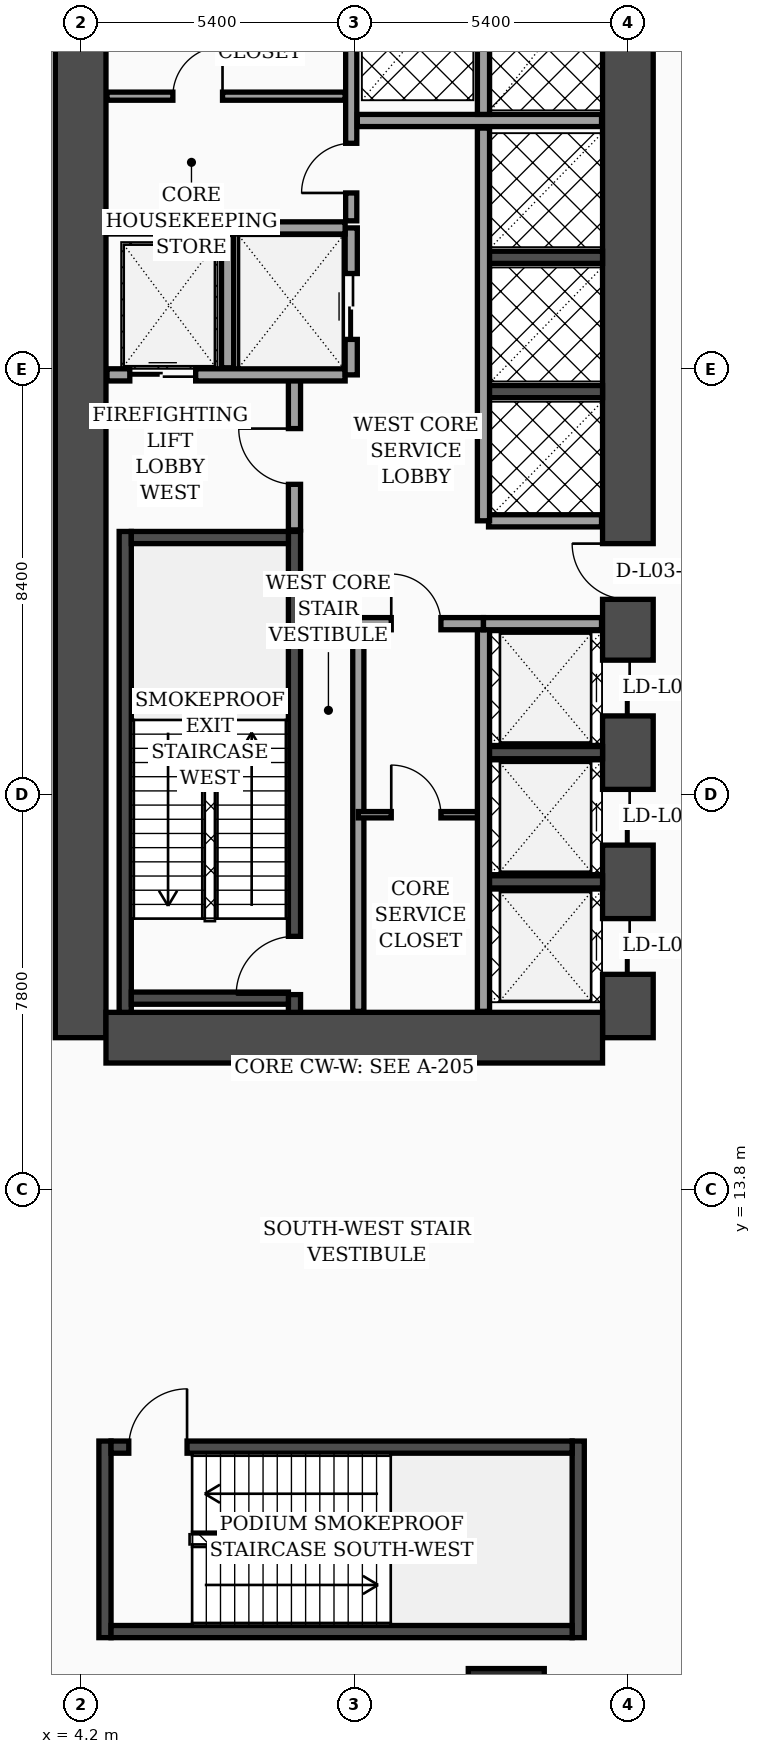
"""IFC4 building model, lengths in metres.
Left out: names, types, materials, properties, quantities, classifications, styles, units other than length and angle.
Written with IfcOpenShell. Run it as: python <this file> out.ifc"""

import sys

from ifc_helpers import new_model, si_unit, direction, frame, frame_2d, origin, origin_2d, place, context, subcontext, project, spatial, rectangle, extrude, element, fill, save


model = new_model("IFC4")
c1 = context("Model", 3, precision=1e-05, world=origin(), true_north=direction((0.0, 1.0)))
c2 = subcontext(c1, "Body", "Model", "MODEL_VIEW")
j1 = project(units=[si_unit("LENGTHUNIT", "METRE"), si_unit("PLANEANGLEUNIT", "RADIAN")], contexts=[c1])
p1 = place(None, origin())
s1 = spatial("IfcSite", under=j1, at=p1, CompositionType="ELEMENT")
p2 = place(p1, origin())
s2 = spatial("IfcBuilding", under=s1, at=p2, CompositionType="ELEMENT")
p3 = place(p2, frame((0.0, 0.0, 17.0)))
s3 = spatial("IfcBuildingStorey", under=s2, at=p3, CompositionType="ELEMENT", Elevation=17.0)
p4 = place(p3, frame((4.2, 16.8, 0.0), z_axis=(0.0, 0.0, 1.0), x_axis=(0.0, 1.0, 0.0)))
e1 = element("IfcWall", 1, at=p4, inside=s3, PredefinedType="SHEAR", context=c2, shape_type="SweptSolid", body=[
    extrude(rectangle(XDim=21.6, YDim=1.0, at=frame_2d((10.8, 0.0))), origin(), (0.0, 0.0, 1.0), 4.55),
])
p5 = place(p3, frame((15.0, 16.8, 0.0), z_axis=(0.0, 0.0, 1.0), x_axis=(0.0, 1.0, 0.0)))
e2 = element("IfcWall", 2, at=p5, inside=s3, PredefinedType="SHEAR", context=c2, shape_type="SweptSolid", body=[
    extrude(rectangle(XDim=21.6, YDim=1.0, at=frame_2d((10.8, 0.0))), origin(), (0.0, 0.0, 1.0), 4.55),
])
p6 = place(p5, frame((8.65, 0.0, 0.0)))
e3 = element("IfcOpeningElement", 3, at=p6, cuts=e2, PredefinedType="OPENING", context=c2, shape_type="SweptSolid", body=[
    extrude(rectangle(XDim=1.1, YDim=2.2, at=frame_2d((0.55, 1.1))), frame((0.0, 0.51, 0.0), z_axis=(0.0, -1.0, 0.0), x_axis=(1.0, 0.0, 0.0)), (0.0, 0.0, 1.0), 1.02),
])
p7 = place(p5, frame((1.25, 0.0, 0.0)))
e4 = element("IfcOpeningElement", 4, at=p7, cuts=e2, PredefinedType="OPENING", context=c2, shape_type="SweptSolid", body=[
    extrude(rectangle(XDim=1.1, YDim=2.2, at=frame_2d((0.55, 1.1))), frame((0.0, 0.51, 0.0), z_axis=(0.0, -1.0, 0.0), x_axis=(1.0, 0.0, 0.0)), (0.0, 0.0, 1.0), 1.02),
])
p8 = place(p5, frame((3.8, 0.0, 0.0)))
e5 = element("IfcOpeningElement", 5, at=p8, cuts=e2, PredefinedType="OPENING", context=c2, shape_type="SweptSolid", body=[
    extrude(rectangle(XDim=1.1, YDim=2.2, at=frame_2d((0.55, 1.1))), frame((0.0, 0.51, 0.0), z_axis=(0.0, -1.0, 0.0), x_axis=(1.0, 0.0, 0.0)), (0.0, 0.0, 1.0), 1.02),
])
p9 = place(p5, frame((6.35, 0.0, 0.0)))
e6 = element("IfcOpeningElement", 6, at=p9, cuts=e2, PredefinedType="OPENING", context=c2, shape_type="SweptSolid", body=[
    extrude(rectangle(XDim=1.1, YDim=2.2, at=frame_2d((0.55, 1.1))), frame((0.0, 0.51, 0.0), z_axis=(0.0, -1.0, 0.0), x_axis=(1.0, 0.0, 0.0)), (0.0, 0.0, 1.0), 1.02),
])
p10 = place(p3, frame((4.7, 16.8, 0.0), z_axis=(0.0, 0.0, 1.0), x_axis=(1.0, 0.0, 0.0)))
e7 = element("IfcWall", 7, at=p10, inside=s3, PredefinedType="SHEAR", context=c2, shape_type="SweptSolid", body=[
    extrude(rectangle(XDim=9.8, YDim=1.0, at=frame_2d((4.9, 0.0))), origin(), (0.0, 0.0, 1.0), 4.55),
])
p11 = place(p3, frame((5.08, 17.3, 0.0), z_axis=(0.0, 0.0, 1.0), x_axis=(0.0, 1.0, 0.0)))
e8 = element("IfcWall", 8, at=p11, inside=s3, PredefinedType="SOLIDWALL", context=c2, shape_type="SweptSolid", body=[
    extrude(rectangle(XDim=9.49, YDim=0.24, at=frame_2d((4.745, 0.0))), origin(), (0.0, 0.0, 1.0), 4.55),
])
p12 = place(p3, frame((8.42, 17.3, 0.0), z_axis=(0.0, 0.0, 1.0), x_axis=(0.0, 1.0, 0.0)))
e9 = element("IfcWall", 9, at=p12, inside=s3, PredefinedType="SOLIDWALL", context=c2, shape_type="SweptSolid", body=[
    extrude(rectangle(XDim=9.49, YDim=0.24, at=frame_2d((4.745, 0.0))), origin(), (0.0, 0.0, 1.0), 4.55),
])
p13 = place(p12, frame((0.35, 0.0, 0.0)))
e10 = element("IfcOpeningElement", 10, at=p13, cuts=e9, PredefinedType="OPENING", context=c2, shape_type="SweptSolid", body=[
    extrude(rectangle(XDim=1.15, YDim=2.2, at=frame_2d((0.575, 1.1))), frame((0.0, 0.13, 0.0), z_axis=(0.0, -1.0, 0.0), x_axis=(1.0, 0.0, 0.0)), (0.0, 0.0, 1.0), 0.26),
])
for number, where, z_axis, x_axis in (
    (11, (5.2, 17.58, 0.0), (0.0, 0.0, 1.0), (1.0, 0.0, 0.0)),
    (12, (5.2, 26.67, 0.0), (0.0, 0.0, 1.0), (1.0, 0.0, 0.0)),
):
    element("IfcWall", number, at=place(p3, frame(where, z_axis=z_axis, x_axis=x_axis)), inside=s3, PredefinedType="SOLIDWALL", context=c2, shape_type="SweptSolid", body=[
        extrude(rectangle(XDim=3.1, YDim=0.24, at=frame_2d((1.55, 0.0))), origin(), (0.0, 0.0, 1.0), 4.55),
    ])
for number, where, z_axis, x_axis in (
    (13, (4.68, 4.96, 0.0), (0.0, 0.0, 1.0), (0.0, 1.0, 0.0)),
    (14, (14.02, 4.96, 0.0), (0.0, 0.0, 1.0), (0.0, 1.0, 0.0)),
):
    element("IfcWall", number, at=place(p3, frame(where, z_axis=z_axis, x_axis=x_axis)), inside=s3, PredefinedType="SOLIDWALL", context=c2, shape_type="SweptSolid", body=[
        extrude(rectangle(XDim=3.88, YDim=0.24, at=frame_2d((1.94, 0.0))), origin(), (0.0, 0.0, 1.0), 4.55),
    ])
p14 = place(p3, frame((4.8, 5.08, 0.0), z_axis=(0.0, 0.0, 1.0), x_axis=(1.0, 0.0, 0.0)))
e15 = element("IfcWall", 15, at=p14, inside=s3, PredefinedType="SOLIDWALL", context=c2, shape_type="SweptSolid", body=[
    extrude(rectangle(XDim=9.1, YDim=0.24, at=frame_2d((4.55, 0.0))), origin(), (0.0, 0.0, 1.0), 4.55),
])
p15 = place(p3, frame((4.8, 8.72, 0.0), z_axis=(0.0, 0.0, 1.0), x_axis=(1.0, 0.0, 0.0)))
e16 = element("IfcWall", 16, at=p15, inside=s3, PredefinedType="SOLIDWALL", context=c2, shape_type="SweptSolid", body=[
    extrude(rectangle(XDim=9.1, YDim=0.24, at=frame_2d((4.55, 0.0))), origin(), (0.0, 0.0, 1.0), 4.55),
])
p16 = place(p15, frame((0.35, 0.0, 0.0)))
e17 = element("IfcOpeningElement", 17, at=p16, cuts=e16, PredefinedType="OPENING", context=c2, shape_type="SweptSolid", body=[
    extrude(rectangle(XDim=1.15, YDim=2.2, at=frame_2d((0.575, 1.1))), frame((0.0, 0.13, 0.0), z_axis=(0.0, -1.0, 0.0), x_axis=(1.0, 0.0, 0.0)), (0.0, 0.0, 1.0), 0.26),
])
for number, where, z_axis, x_axis in (
    (18, (12.18, 19.875, 0.0), (0.0, 0.0, 1.0), (1.0, 0.0, 0.0)),
    (19, (12.18, 22.425, 0.0), (0.0, 0.0, 1.0), (1.0, 0.0, 0.0)),
    (20, (12.18, 29.55, 0.0), (0.0, 0.0, 1.0), (1.0, 0.0, 0.0)),
    (21, (12.18, 32.2, 0.0), (0.0, 0.0, 1.0), (1.0, 0.0, 0.0)),
):
    element("IfcWall", number, at=place(p3, frame(where, z_axis=z_axis, x_axis=x_axis)), inside=s3, PredefinedType="SOLIDWALL", context=c2, shape_type="SweptSolid", body=[
        extrude(rectangle(XDim=2.32, YDim=0.24, at=frame_2d((1.16, 0.0))), origin(), (0.0, 0.0, 1.0), 4.55),
    ])
p17 = place(p3, frame((12.6, 3.6, 0.0), z_axis=(0.0, 0.0, 1.0), x_axis=(1.0, 0.0, 0.0)))
e22 = element("IfcColumn", 22, at=p17, inside=s3, PredefinedType="COLUMN", context=c2, shape_type="SweptSolid", body=[
    extrude(rectangle(XDim=1.5, YDim=1.5, at=origin_2d()), origin(), (0.0, 0.0, 1.0), 4.55),
])
p18 = place(p3, frame((8.42, 26.82, 0.0), z_axis=(0.0, 0.0, 1.0), x_axis=(0.0, 1.0, 0.0)))
e23 = element("IfcWall", 23, at=p18, inside=s3, PredefinedType="SOLIDWALL", context=c2, shape_type="SweptSolid", body=[
    extrude(rectangle(XDim=3.0, YDim=0.24, at=frame_2d((1.5, 0.0))), origin(), (0.0, 0.0, 1.0), 4.55),
])
p19 = place(p18, frame((0.9, 0.0, 0.0)))
e24 = element("IfcOpeningElement", 24, at=p19, cuts=e23, PredefinedType="OPENING", context=c2, shape_type="SweptSolid", body=[
    extrude(rectangle(XDim=1.1, YDim=2.2, at=frame_2d((0.55, 1.1))), frame((0.0, 0.13, 0.0), z_axis=(0.0, -1.0, 0.0), x_axis=(1.0, 0.0, 0.0)), (0.0, 0.0, 1.0), 0.26),
])
p20 = place(p3, frame((4.72, 29.88, 0.0), z_axis=(0.0, 0.0, 1.0), x_axis=(1.0, 0.0, 0.0)))
e25 = element("IfcWall", 25, at=p20, inside=s3, PredefinedType="SOLIDWALL", context=c2, shape_type="SweptSolid", body=[
    extrude(rectangle(XDim=4.7, YDim=0.24, at=frame_2d((2.35, 0.0))), origin(), (0.0, 0.0, 1.0), 4.55),
])
p21 = place(p20, frame((0.45, 0.0, 0.0)))
e26 = element("IfcOpeningElement", 26, at=p21, cuts=e25, PredefinedType="OPENING", context=c2, shape_type="SweptSolid", body=[
    extrude(rectangle(XDim=1.3, YDim=2.35, at=frame_2d((0.65, 1.175))), frame((0.0, 0.13, 0.0), z_axis=(0.0, -1.0, 0.0), x_axis=(1.0, 0.0, 0.0)), (0.0, 0.0, 1.0), 0.26),
])
p22 = place(p3, frame((7.1, 30.02, 0.0), z_axis=(0.0, 0.0, 1.0), x_axis=(0.0, 1.0, 0.0)))
e27 = element("IfcWall", 27, at=p22, inside=s3, PredefinedType="SOLIDWALL", context=c2, shape_type="SweptSolid", body=[
    extrude(rectangle(XDim=2.63, YDim=0.24, at=frame_2d((1.315, 0.0))), origin(), (0.0, 0.0, 1.0), 4.55),
])
p23 = place(p3, frame((9.54, 29.88, 0.0), z_axis=(0.0, 0.0, 1.0), x_axis=(0.0, 1.0, 0.0)))
e28 = element("IfcWall", 28, at=p23, inside=s3, PredefinedType="SOLIDWALL", context=c2, shape_type="SweptSolid", body=[
    extrude(rectangle(XDim=2.9, YDim=0.24, at=frame_2d((1.45, 0.0))), origin(), (0.0, 0.0, 1.0), 4.55),
])
p24 = place(p23, frame((0.7, 0.0, 0.0)))
e29 = element("IfcOpeningElement", 29, at=p24, cuts=e28, PredefinedType="OPENING", context=c2, shape_type="SweptSolid", body=[
    extrude(rectangle(XDim=1.3, YDim=2.35, at=frame_2d((0.65, 1.175))), frame((0.0, 0.13, 0.0), z_axis=(0.0, -1.0, 0.0), x_axis=(1.0, 0.0, 0.0)), (0.0, 0.0, 1.0), 0.26),
])
p25 = place(p3, frame((4.72, 32.78, 0.0), z_axis=(0.0, 0.0, 1.0), x_axis=(1.0, 0.0, 0.0)))
e30 = element("IfcWall", 30, at=p25, inside=s3, PredefinedType="SOLIDWALL", context=c2, shape_type="SweptSolid", body=[
    extrude(rectangle(XDim=4.7, YDim=0.24, at=frame_2d((2.35, 0.0))), origin(), (0.0, 0.0, 1.0), 4.55),
])
p26 = place(p3, frame((9.68, 17.32, 0.0), z_axis=(0.0, 0.0, 1.0), x_axis=(0.0, 1.0, 0.0)))
e31 = element("IfcWall", 31, at=p26, inside=s3, PredefinedType="SOLIDWALL", context=c2, shape_type="SweptSolid", body=[
    extrude(rectangle(XDim=7.68, YDim=0.22, at=frame_2d((3.84, 0.0))), origin(), (0.0, 0.0, 1.0), 4.55),
])
p27 = place(p3, frame((4.72, 35.38, 0.0), z_axis=(0.0, 0.0, 1.0), x_axis=(1.0, 0.0, 0.0)))
e32 = element("IfcWall", 32, at=p27, inside=s3, PredefinedType="PARTITIONING", context=c2, shape_type="SweptSolid", body=[
    extrude(rectangle(XDim=4.7, YDim=0.16, at=frame_2d((2.35, 0.0))), origin(), (0.0, 0.0, 1.0), 4.55),
])
p28 = place(p27, frame((1.3, 0.0, 0.0)))
e33 = element("IfcOpeningElement", 33, at=p28, cuts=e32, PredefinedType="OPENING", context=c2, shape_type="SweptSolid", body=[
    extrude(rectangle(XDim=0.98, YDim=2.15, at=frame_2d((0.49, 1.075))), frame((0.0, 0.09, 0.0), z_axis=(0.0, -1.0, 0.0), x_axis=(1.0, 0.0, 0.0)), (0.0, 0.0, 1.0), 0.18),
])
p29 = place(p3, frame((9.54, 32.92, 0.0), z_axis=(0.0, 0.0, 1.0), x_axis=(0.0, 1.0, 0.0)))
e34 = element("IfcWall", 34, at=p29, inside=s3, PredefinedType="SOLIDWALL", context=c2, shape_type="SweptSolid", body=[
    extrude(rectangle(XDim=4.96, YDim=0.22, at=frame_2d((2.48, 0.0))), origin(), (0.0, 0.0, 1.0), 4.55),
])
p30 = place(p29, frame((0.55, 0.0, 0.0)))
e35 = element("IfcOpeningElement", 35, at=p30, cuts=e34, PredefinedType="OPENING", context=c2, shape_type="SweptSolid", body=[
    extrude(rectangle(XDim=0.98, YDim=2.15, at=frame_2d((0.49, 1.075))), frame((0.0, 0.12, 0.0), z_axis=(0.0, -1.0, 0.0), x_axis=(1.0, 0.0, 0.0)), (0.0, 0.0, 1.0), 0.24),
])
p31 = place(p3, frame((9.68, 21.2, 0.0), z_axis=(0.0, 0.0, 1.0), x_axis=(1.0, 0.0, 0.0)))
e36 = element("IfcWall", 36, at=p31, inside=s3, PredefinedType="PARTITIONING", context=c2, shape_type="SweptSolid", body=[
    extrude(rectangle(XDim=2.47, YDim=0.125, at=frame_2d((1.235, 0.0))), origin(), (0.0, 0.0, 1.0), 4.55),
])
p32 = place(p31, frame((0.65, 0.0, 0.0)))
e37 = element("IfcOpeningElement", 37, at=p32, cuts=e36, PredefinedType="OPENING", context=c2, shape_type="SweptSolid", body=[
    extrude(rectangle(XDim=0.98, YDim=2.15, at=frame_2d((0.49, 1.075))), frame((0.0, 0.073, 0.0), z_axis=(0.0, -1.0, 0.0), x_axis=(1.0, 0.0, 0.0)), (0.0, 0.0, 1.0), 0.145),
])
p33 = place(p3, frame((12.15, 17.32, 0.0), z_axis=(0.0, 0.0, 1.0), x_axis=(0.0, 1.0, 0.0)))
e38 = element("IfcWall", 38, at=p33, inside=s3, PredefinedType="SOLIDWALL", context=c2, shape_type="SweptSolid", body=[
    extrude(rectangle(XDim=7.65, YDim=0.24, at=frame_2d((3.825, 0.0))), origin(), (0.0, 0.0, 1.0), 4.55),
])
p34 = place(p3, frame((9.68, 24.97, 0.0), z_axis=(0.0, 0.0, 1.0), x_axis=(1.0, 0.0, 0.0)))
e39 = element("IfcWall", 39, at=p34, inside=s3, PredefinedType="SOLIDWALL", context=c2, shape_type="SweptSolid", body=[
    extrude(rectangle(XDim=2.47, YDim=0.24, at=frame_2d((1.235, 0.0))), origin(), (0.0, 0.0, 1.0), 4.55),
])
p35 = place(p34, frame((0.65, 0.0, 0.0)))
e40 = element("IfcOpeningElement", 40, at=p35, cuts=e39, PredefinedType="OPENING", context=c2, shape_type="SweptSolid", body=[
    extrude(rectangle(XDim=0.98, YDim=2.15, at=frame_2d((0.49, 1.075))), frame((0.0, 0.13, 0.0), z_axis=(0.0, -1.0, 0.0), x_axis=(1.0, 0.0, 0.0)), (0.0, 0.0, 1.0), 0.26),
])
p36 = place(p3, frame((12.15, 24.97, 0.0), z_axis=(0.0, 0.0, 1.0), x_axis=(1.0, 0.0, 0.0)))
e41 = element("IfcWall", 41, at=p36, inside=s3, PredefinedType="SOLIDWALL", context=c2, shape_type="SweptSolid", body=[
    extrude(rectangle(XDim=2.33, YDim=0.24, at=frame_2d((1.165, 0.0))), origin(), (0.0, 0.0, 1.0), 3.75),
])
p37 = place(p3, frame((12.25, 27.0, 0.0), z_axis=(0.0, 0.0, 1.0), x_axis=(1.0, 0.0, 0.0)))
e42 = element("IfcWall", 42, at=p37, inside=s3, PredefinedType="SOLIDWALL", context=c2, shape_type="SweptSolid", body=[
    extrude(rectangle(XDim=2.23, YDim=0.24, at=frame_2d((1.115, 0.0))), origin(), (0.0, 0.0, 1.0), 4.55),
])
p38 = place(p3, frame((12.15, 27.0, 0.0), z_axis=(0.0, 0.0, 1.0), x_axis=(0.0, 1.0, 0.0)))
e43 = element("IfcWall", 43, at=p38, inside=s3, PredefinedType="SOLIDWALL", context=c2, shape_type="SweptSolid", body=[
    extrude(rectangle(XDim=7.75, YDim=0.24, at=frame_2d((3.875, 0.0))), origin(), (0.0, 0.0, 1.0), 4.55),
])
p39 = place(p3, frame((9.66, 34.9, 0.0), z_axis=(0.0, 0.0, 1.0), x_axis=(1.0, 0.0, 0.0)))
e44 = element("IfcWall", 44, at=p39, inside=s3, PredefinedType="SOLIDWALL", context=c2, shape_type="SweptSolid", body=[
    extrude(rectangle(XDim=4.82, YDim=0.24, at=frame_2d((2.41, 0.0))), origin(), (0.0, 0.0, 1.0), 4.55),
])
p40 = place(p3, frame((12.15, 35.02, 0.0), z_axis=(0.0, 0.0, 1.0), x_axis=(0.0, 1.0, 0.0)))
e45 = element("IfcWall", 45, at=p40, inside=s3, PredefinedType="SOLIDWALL", context=c2, shape_type="SweptSolid", body=[
    extrude(rectangle(XDim=2.86, YDim=0.24, at=frame_2d((1.43, 0.0))), origin(), (0.0, 0.0, 1.0), 4.55),
])
p41 = place(p19, origin())
e46 = element("IfcDoor", 46, at=p41, inside=s3, OperationType="SINGLE_SWING_RIGHT", PredefinedType="DOOR", context=c2, shape_type="SweptSolid", body=[
    extrude(rectangle(XDim=1.1, YDim=2.2, at=frame_2d((0.55, 1.1))), frame((0.0, 0.025, 0.0), z_axis=(0.0, -1.0, 0.0), x_axis=(1.0, 0.0, 0.0)), (0.0, 0.0, 1.0), 0.05),
])
fill(e24, e46)
p42 = place(p21, origin())
e47 = element("IfcDoor", 47, at=p42, inside=s3, OperationType="DOUBLE_DOOR_SLIDING", PredefinedType="DOOR", context=c2, shape_type="SweptSolid", body=[
    extrude(rectangle(XDim=1.3, YDim=2.35, at=frame_2d((0.65, 1.175))), frame((0.0, 0.025, 0.0), z_axis=(0.0, -1.0, 0.0), x_axis=(1.0, 0.0, 0.0)), (0.0, 0.0, 1.0), 0.05),
])
fill(e26, e47)
p43 = place(p24, origin())
e48 = element("IfcDoor", 48, at=p43, inside=s3, OperationType="DOUBLE_DOOR_SLIDING", PredefinedType="DOOR", context=c2, shape_type="SweptSolid", body=[
    extrude(rectangle(XDim=1.3, YDim=2.35, at=frame_2d((0.65, 1.175))), frame((0.0, 0.025, 0.0), z_axis=(0.0, -1.0, 0.0), x_axis=(1.0, 0.0, 0.0)), (0.0, 0.0, 1.0), 0.05),
])
fill(e29, e48)
p44 = place(p28, origin())
e49 = element("IfcDoor", 49, at=p44, inside=s3, OperationType="SINGLE_SWING_RIGHT", PredefinedType="DOOR", context=c2, shape_type="SweptSolid", body=[
    extrude(rectangle(XDim=0.98, YDim=2.15, at=frame_2d((0.49, 1.075))), frame((0.0, 0.025, 0.0), z_axis=(0.0, -1.0, 0.0), x_axis=(1.0, 0.0, 0.0)), (0.0, 0.0, 1.0), 0.05),
])
fill(e33, e49)
p45 = place(p30, origin())
e50 = element("IfcDoor", 50, at=p45, inside=s3, OperationType="SINGLE_SWING_LEFT", PredefinedType="DOOR", context=c2, shape_type="SweptSolid", body=[
    extrude(rectangle(XDim=0.98, YDim=2.15, at=frame_2d((0.49, 1.075))), frame((0.0, 0.025, 0.0), z_axis=(0.0, -1.0, 0.0), x_axis=(1.0, 0.0, 0.0)), (0.0, 0.0, 1.0), 0.05),
])
fill(e35, e50)
p46 = place(p32, origin())
e51 = element("IfcDoor", 51, at=p46, inside=s3, OperationType="SINGLE_SWING_LEFT", PredefinedType="DOOR", context=c2, shape_type="SweptSolid", body=[
    extrude(rectangle(XDim=0.98, YDim=2.15, at=frame_2d((0.49, 1.075))), frame((0.0, 0.025, 0.0), z_axis=(0.0, -1.0, 0.0), x_axis=(1.0, 0.0, 0.0)), (0.0, 0.0, 1.0), 0.05),
])
fill(e37, e51)
p47 = place(p35, origin())
e52 = element("IfcDoor", 52, at=p47, inside=s3, OperationType="SINGLE_SWING_LEFT", PredefinedType="DOOR", context=c2, shape_type="SweptSolid", body=[
    extrude(rectangle(XDim=0.98, YDim=2.15, at=frame_2d((0.49, 1.075))), frame((0.0, 0.025, 0.0), z_axis=(0.0, -1.0, 0.0), x_axis=(1.0, 0.0, 0.0)), (0.0, 0.0, 1.0), 0.05),
])
fill(e40, e52)
p48 = place(p13, origin())
e53 = element("IfcDoor", 53, at=p48, inside=s3, OperationType="SINGLE_SWING_LEFT", PredefinedType="DOOR", context=c2, shape_type="SweptSolid", body=[
    extrude(rectangle(XDim=1.15, YDim=2.2, at=frame_2d((0.575, 1.1))), frame((0.0, 0.025, 0.0), z_axis=(0.0, -1.0, 0.0), x_axis=(1.0, 0.0, 0.0)), (0.0, 0.0, 1.0), 0.05),
])
fill(e10, e53)
p49 = place(p16, origin())
e54 = element("IfcDoor", 54, at=p49, inside=s3, OperationType="SINGLE_SWING_RIGHT", PredefinedType="DOOR", context=c2, shape_type="SweptSolid", body=[
    extrude(rectangle(XDim=1.15, YDim=2.2, at=frame_2d((0.575, 1.1))), frame((0.0, 0.025, 0.0), z_axis=(0.0, -1.0, 0.0), x_axis=(1.0, 0.0, 0.0)), (0.0, 0.0, 1.0), 0.05),
])
fill(e17, e54)
p50 = place(p6, origin())
e55 = element("IfcDoor", 55, at=p50, inside=s3, OperationType="SINGLE_SWING_RIGHT", PredefinedType="DOOR", context=c2, shape_type="SweptSolid", body=[
    extrude(rectangle(XDim=1.1, YDim=2.2, at=frame_2d((0.55, 1.1))), frame((0.0, 0.025, 0.0), z_axis=(0.0, -1.0, 0.0), x_axis=(1.0, 0.0, 0.0)), (0.0, 0.0, 1.0), 0.05),
])
fill(e3, e55)
p51 = place(p7, origin())
e56 = element("IfcDoor", 56, at=p51, inside=s3, OperationType="DOUBLE_DOOR_SLIDING", PredefinedType="DOOR", context=c2, shape_type="SweptSolid", body=[
    extrude(rectangle(XDim=1.1, YDim=2.2, at=frame_2d((0.55, 1.1))), frame((0.0, 0.025, 0.0), z_axis=(0.0, -1.0, 0.0), x_axis=(1.0, 0.0, 0.0)), (0.0, 0.0, 1.0), 0.05),
])
fill(e4, e56)
p52 = place(p8, origin())
e57 = element("IfcDoor", 57, at=p52, inside=s3, OperationType="DOUBLE_DOOR_SLIDING", PredefinedType="DOOR", context=c2, shape_type="SweptSolid", body=[
    extrude(rectangle(XDim=1.1, YDim=2.2, at=frame_2d((0.55, 1.1))), frame((0.0, 0.025, 0.0), z_axis=(0.0, -1.0, 0.0), x_axis=(1.0, 0.0, 0.0)), (0.0, 0.0, 1.0), 0.05),
])
fill(e5, e57)
p53 = place(p9, origin())
e58 = element("IfcDoor", 58, at=p53, inside=s3, OperationType="DOUBLE_DOOR_SLIDING", PredefinedType="DOOR", context=c2, shape_type="SweptSolid", body=[
    extrude(rectangle(XDim=1.1, YDim=2.2, at=frame_2d((0.55, 1.1))), frame((0.0, 0.025, 0.0), z_axis=(0.0, -1.0, 0.0), x_axis=(1.0, 0.0, 0.0)), (0.0, 0.0, 1.0), 0.05),
])
fill(e6, e58)
save(model, sys.argv[1])
